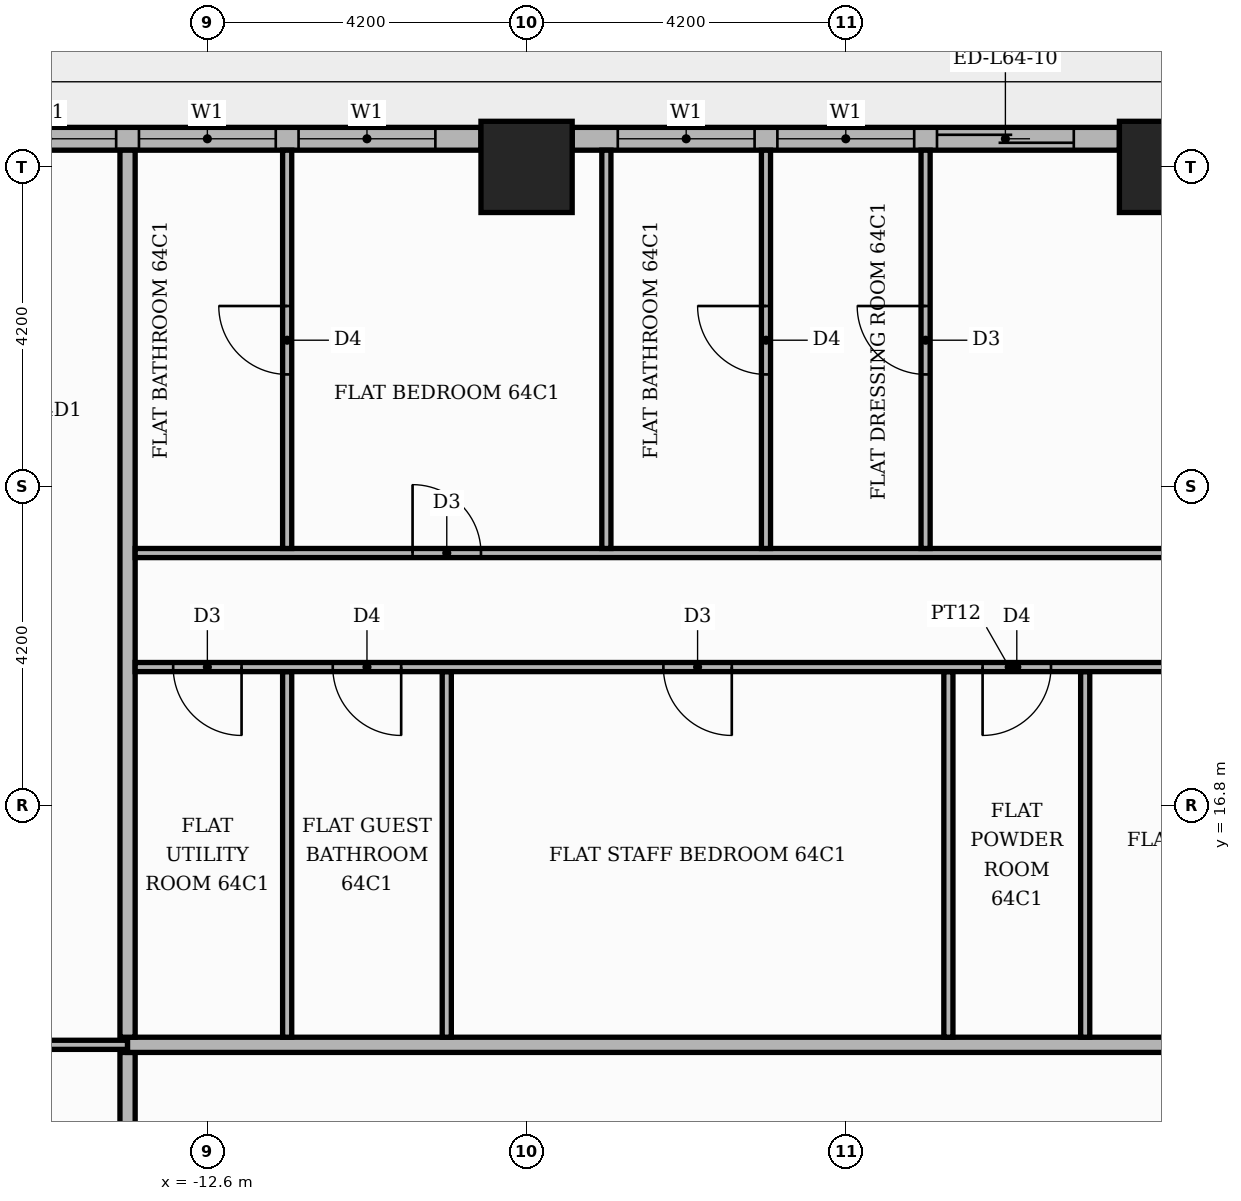
"""IFC4 building model, lengths in metres.
Left out: names, types, materials, properties, quantities, classifications, styles, units other than length and angle.
Written with IfcOpenShell. Run it as: python <this file> out.ifc"""

import sys

from ifc_helpers import new_model, si_unit, direction, frame, frame_2d, origin, origin_2d, place, context, subcontext, project, spatial, rectangle, extrude, element, fill, save


model = new_model("IFC4")
c1 = context("Model", 3, precision=1e-05, world=origin(), true_north=direction((0.0, 1.0)))
c2 = subcontext(c1, "Body", "Model", "MODEL_VIEW")
j1 = project(units=[si_unit("LENGTHUNIT", "METRE"), si_unit("PLANEANGLEUNIT", "RADIAN")], contexts=[c1])
p1 = place(None, origin())
s1 = spatial("IfcSite", under=j1, at=p1, CompositionType="ELEMENT")
p2 = place(p1, origin())
s2 = spatial("IfcBuilding", under=s1, at=p2, CompositionType="ELEMENT")
p3 = place(p2, frame((0.0, 0.0, 267.9)))
s3 = spatial("IfcBuildingStorey", under=s2, at=p3, CompositionType="ELEMENT", Elevation=267.9)
for number, where, z_axis, x_axis in (
    (1, (0.0, 25.2, 0.0), (0.0, 0.0, 1.0), (1.0, 0.0, 0.0)),
    (2, (-8.4, 25.2, 0.0), (0.0, 0.0, 1.0), (1.0, 0.0, 0.0)),
):
    element("IfcColumn", number, at=place(p3, frame(where, z_axis=z_axis, x_axis=x_axis)), inside=s3, PredefinedType="COLUMN", context=c2, shape_type="SweptSolid", body=[
        extrude(rectangle(XDim=1.2, YDim=1.2, at=origin_2d()), origin(), (0.0, 0.0, 1.0), 3.9),
    ])
p4 = place(p3, frame((-0.6, 25.57, 0.0), z_axis=(0.0, 0.0, 1.0), x_axis=(-1.0, 0.0, 0.0)))
e3 = element("IfcWall", 3, at=p4, inside=s3, PredefinedType="STANDARD", context=c2, shape_type="SweptSolid", body=[
    extrude(rectangle(XDim=7.2, YDim=0.3, at=frame_2d((3.6, 0.0))), origin(), (0.0, 0.0, 1.0), 3.48),
])
p5 = place(p4, frame((0.6, 0.0, 0.0)))
e4 = element("IfcOpeningElement", 4, at=p5, cuts=e3, PredefinedType="OPENING", context=c2, shape_type="SweptSolid", body=[
    extrude(rectangle(XDim=1.8, YDim=2.4, at=frame_2d((0.9, 1.2))), frame((0.0, 0.16, 0.0), z_axis=(0.0, -1.0, 0.0), x_axis=(1.0, 0.0, 0.0)), (0.0, 0.0, 1.0), 0.32),
])
p6 = place(p4, frame((2.7, 0.0, 0.9)))
e5 = element("IfcOpeningElement", 5, at=p6, cuts=e3, PredefinedType="OPENING", context=c2, shape_type="SweptSolid", body=[
    extrude(rectangle(XDim=1.8, YDim=2.1, at=frame_2d((0.9, 1.05))), frame((0.0, 0.16, 0.0), z_axis=(0.0, -1.0, 0.0), x_axis=(1.0, 0.0, 0.0)), (0.0, 0.0, 1.0), 0.32),
])
p7 = place(p4, frame((4.8, 0.0, 0.9)))
e6 = element("IfcOpeningElement", 6, at=p7, cuts=e3, PredefinedType="OPENING", context=c2, shape_type="SweptSolid", body=[
    extrude(rectangle(XDim=1.8, YDim=2.1, at=frame_2d((0.9, 1.05))), frame((0.0, 0.16, 0.0), z_axis=(0.0, -1.0, 0.0), x_axis=(1.0, 0.0, 0.0)), (0.0, 0.0, 1.0), 0.32),
])
p8 = place(p3, frame((-9.0, 25.57, 0.0), z_axis=(0.0, 0.0, 1.0), x_axis=(-1.0, 0.0, 0.0)))
e7 = element("IfcWall", 7, at=p8, inside=s3, PredefinedType="STANDARD", context=c2, shape_type="SweptSolid", body=[
    extrude(rectangle(XDim=7.2, YDim=0.3, at=frame_2d((3.6, 0.0))), origin(), (0.0, 0.0, 1.0), 3.48),
])
p9 = place(p8, frame((0.6, 0.0, 0.9)))
e8 = element("IfcOpeningElement", 8, at=p9, cuts=e7, PredefinedType="OPENING", context=c2, shape_type="SweptSolid", body=[
    extrude(rectangle(XDim=1.8, YDim=2.1, at=frame_2d((0.9, 1.05))), frame((0.0, 0.16, 0.0), z_axis=(0.0, -1.0, 0.0), x_axis=(1.0, 0.0, 0.0)), (0.0, 0.0, 1.0), 0.32),
])
p10 = place(p8, frame((2.7, 0.0, 0.9)))
e9 = element("IfcOpeningElement", 9, at=p10, cuts=e7, PredefinedType="OPENING", context=c2, shape_type="SweptSolid", body=[
    extrude(rectangle(XDim=1.8, YDim=2.1, at=frame_2d((0.9, 1.05))), frame((0.0, 0.16, 0.0), z_axis=(0.0, -1.0, 0.0), x_axis=(1.0, 0.0, 0.0)), (0.0, 0.0, 1.0), 0.32),
])
p11 = place(p8, frame((4.8, 0.0, 0.9)))
e10 = element("IfcOpeningElement", 10, at=p11, cuts=e7, PredefinedType="OPENING", context=c2, shape_type="SweptSolid", body=[
    extrude(rectangle(XDim=1.8, YDim=2.1, at=frame_2d((0.9, 1.05))), frame((0.0, 0.16, 0.0), z_axis=(0.0, -1.0, 0.0), x_axis=(1.0, 0.0, 0.0)), (0.0, 0.0, 1.0), 0.32),
])
p12 = place(p3, frame((-13.65, 11.1, 0.0), z_axis=(0.0, 0.0, 1.0), x_axis=(0.0, 1.0, 0.0)))
e11 = element("IfcWall", 11, at=p12, inside=s3, PredefinedType="PARTITIONING", context=c2, shape_type="SweptSolid", body=[
    extrude(rectangle(XDim=2.45, YDim=0.2, at=frame_2d((1.225, 0.0))), origin(), (0.0, 0.0, 1.0), 3.48),
])
p13 = place(p3, frame((-20.42, 13.65, 0.0), z_axis=(0.0, 0.0, 1.0), x_axis=(1.0, 0.0, 0.0)))
e12 = element("IfcWall", 12, at=p13, inside=s3, PredefinedType="PARTITIONING", context=c2, shape_type="SweptSolid", body=[
    extrude(rectangle(XDim=6.77, YDim=0.12, at=frame_2d((3.385, 0.0))), origin(), (0.0, 0.0, 1.0), 3.48),
])
p14 = place(p13, frame((2.885, 0.0, 0.0)))
e13 = element("IfcOpeningElement", 13, at=p14, cuts=e12, PredefinedType="OPENING", context=c2, shape_type="SweptSolid", body=[
    extrude(rectangle(XDim=1.0, YDim=2.1, at=frame_2d((0.5, 1.05))), frame((0.0, 0.07, 0.0), z_axis=(0.0, -1.0, 0.0), x_axis=(1.0, 0.0, 0.0)), (0.0, 0.0, 1.0), 0.14),
])
p15 = place(p3, frame((-13.65, 13.65, 0.0), z_axis=(0.0, 0.0, 1.0), x_axis=(1.0, 0.0, 0.0)))
e14 = element("IfcWall", 14, at=p15, inside=s3, PredefinedType="PARTITIONING", context=c2, shape_type="SweptSolid", body=[
    extrude(rectangle(XDim=39.07, YDim=0.2, at=frame_2d((19.535, 0.0))), origin(), (0.0, 0.0, 1.0), 3.48),
])
p16 = place(p15, frame((24.65, 0.0, 0.0)))
e15 = element("IfcOpeningElement", 15, at=p16, cuts=e14, PredefinedType="OPENING", context=c2, shape_type="SweptSolid", body=[
    extrude(rectangle(XDim=1.1, YDim=2.4, at=frame_2d((0.55, 1.2))), frame((0.0, 0.11, 0.0), z_axis=(0.0, -1.0, 0.0), x_axis=(1.0, 0.0, 0.0)), (0.0, 0.0, 1.0), 0.22),
])
p17 = place(p3, frame((-13.65, 13.75, 0.0), z_axis=(0.0, 0.0, 1.0), x_axis=(0.0, 1.0, 0.0)))
e16 = element("IfcWall", 16, at=p17, inside=s3, PredefinedType="PARTITIONING", context=c2, shape_type="SweptSolid", body=[
    extrude(rectangle(XDim=11.67, YDim=0.2, at=frame_2d((5.835, 0.0))), origin(), (0.0, 0.0, 1.0), 3.48),
])
for number, where, z_axis, x_axis in (
    (17, (-11.55, 13.75, 0.0), (0.0, 0.0, 1.0), (0.0, 1.0, 0.0)),
    (18, (-9.45, 13.75, 0.0), (0.0, 0.0, 1.0), (0.0, 1.0, 0.0)),
    (19, (-2.85, 13.75, 0.0), (0.0, 0.0, 1.0), (0.0, 1.0, 0.0)),
    (20, (-1.05, 13.75, 0.0), (0.0, 0.0, 1.0), (0.0, 1.0, 0.0)),
):
    element("IfcWall", number, at=place(p3, frame(where, z_axis=z_axis, x_axis=x_axis)), inside=s3, PredefinedType="PARTITIONING", context=c2, shape_type="SweptSolid", body=[
        extrude(rectangle(XDim=4.81, YDim=0.12, at=frame_2d((2.405, 0.0))), origin(), (0.0, 0.0, 1.0), 3.48),
    ])
p18 = place(p3, frame((-13.55, 18.62, 0.0), z_axis=(0.0, 0.0, 1.0), x_axis=(1.0, 0.0, 0.0)))
e21 = element("IfcWall", 21, at=p18, inside=s3, PredefinedType="PARTITIONING", context=c2, shape_type="SweptSolid", body=[
    extrude(rectangle(XDim=23.0, YDim=0.12, at=frame_2d((11.5, 0.0))), origin(), (0.0, 0.0, 1.0), 3.48),
])
p19 = place(p18, frame((19.25, 0.0, 0.0)))
e22 = element("IfcOpeningElement", 22, at=p19, cuts=e21, PredefinedType="OPENING", context=c2, shape_type="SweptSolid", body=[
    extrude(rectangle(XDim=0.9, YDim=2.1, at=frame_2d((0.45, 1.05))), frame((0.0, 0.07, 0.0), z_axis=(0.0, -1.0, 0.0), x_axis=(1.0, 0.0, 0.0)), (0.0, 0.0, 1.0), 0.14),
])
p20 = place(p18, frame((14.0, 0.0, 0.0)))
e23 = element("IfcOpeningElement", 23, at=p20, cuts=e21, PredefinedType="OPENING", context=c2, shape_type="SweptSolid", body=[
    extrude(rectangle(XDim=0.9, YDim=2.1, at=frame_2d((0.45, 1.05))), frame((0.0, 0.07, 0.0), z_axis=(0.0, -1.0, 0.0), x_axis=(1.0, 0.0, 0.0)), (0.0, 0.0, 1.0), 0.14),
])
p21 = place(p18, frame((11.15, 0.0, 0.0)))
e24 = element("IfcOpeningElement", 24, at=p21, cuts=e21, PredefinedType="OPENING", context=c2, shape_type="SweptSolid", body=[
    extrude(rectangle(XDim=0.9, YDim=2.1, at=frame_2d((0.45, 1.05))), frame((0.0, 0.07, 0.0), z_axis=(0.0, -1.0, 0.0), x_axis=(1.0, 0.0, 0.0)), (0.0, 0.0, 1.0), 0.14),
])
p22 = place(p18, frame((6.95, 0.0, 0.0)))
e25 = element("IfcOpeningElement", 25, at=p22, cuts=e21, PredefinedType="OPENING", context=c2, shape_type="SweptSolid", body=[
    extrude(rectangle(XDim=0.9, YDim=2.1, at=frame_2d((0.45, 1.05))), frame((0.0, 0.07, 0.0), z_axis=(0.0, -1.0, 0.0), x_axis=(1.0, 0.0, 0.0)), (0.0, 0.0, 1.0), 0.14),
])
p23 = place(p18, frame((2.6, 0.0, 0.0)))
e26 = element("IfcOpeningElement", 26, at=p23, cuts=e21, PredefinedType="OPENING", context=c2, shape_type="SweptSolid", body=[
    extrude(rectangle(XDim=0.9, YDim=2.1, at=frame_2d((0.45, 1.05))), frame((0.0, 0.07, 0.0), z_axis=(0.0, -1.0, 0.0), x_axis=(1.0, 0.0, 0.0)), (0.0, 0.0, 1.0), 0.14),
])
p24 = place(p18, frame((0.5, 0.0, 0.0)))
e27 = element("IfcOpeningElement", 27, at=p24, cuts=e21, PredefinedType="OPENING", context=c2, shape_type="SweptSolid", body=[
    extrude(rectangle(XDim=0.9, YDim=2.1, at=frame_2d((0.45, 1.05))), frame((0.0, 0.07, 0.0), z_axis=(0.0, -1.0, 0.0), x_axis=(1.0, 0.0, 0.0)), (0.0, 0.0, 1.0), 0.14),
])
p25 = place(p3, frame((-13.55, 20.12, 0.0), z_axis=(0.0, 0.0, 1.0), x_axis=(1.0, 0.0, 0.0)))
e28 = element("IfcWall", 28, at=p25, inside=s3, PredefinedType="PARTITIONING", context=c2, shape_type="SweptSolid", body=[
    extrude(rectangle(XDim=34.269, YDim=0.12, at=frame_2d((17.135, 0.0))), origin(), (0.0, 0.0, 1.0), 3.48),
])
p26 = place(p25, frame((27.75, 0.0, 0.0)))
e29 = element("IfcOpeningElement", 29, at=p26, cuts=e28, PredefinedType="OPENING", context=c2, shape_type="SweptSolid", body=[
    extrude(rectangle(XDim=1.0, YDim=2.1, at=frame_2d((0.5, 1.05))), frame((0.0, 0.07, 0.0), z_axis=(0.0, -1.0, 0.0), x_axis=(1.0, 0.0, 0.0)), (0.0, 0.0, 1.0), 0.14),
])
p27 = place(p25, frame((22.5, 0.0, 0.0)))
e30 = element("IfcOpeningElement", 30, at=p27, cuts=e28, PredefinedType="OPENING", context=c2, shape_type="SweptSolid", body=[
    extrude(rectangle(XDim=1.0, YDim=2.1, at=frame_2d((0.5, 1.05))), frame((0.0, 0.07, 0.0), z_axis=(0.0, -1.0, 0.0), x_axis=(1.0, 0.0, 0.0)), (0.0, 0.0, 1.0), 0.14),
])
p28 = place(p25, frame((14.15, 0.0, 0.0)))
e31 = element("IfcOpeningElement", 31, at=p28, cuts=e28, PredefinedType="OPENING", context=c2, shape_type="SweptSolid", body=[
    extrude(rectangle(XDim=0.9, YDim=2.1, at=frame_2d((0.45, 1.05))), frame((0.0, 0.07, 0.0), z_axis=(0.0, -1.0, 0.0), x_axis=(1.0, 0.0, 0.0)), (0.0, 0.0, 1.0), 0.14),
])
p29 = place(p25, frame((3.65, 0.0, 0.0)))
e32 = element("IfcOpeningElement", 32, at=p29, cuts=e28, PredefinedType="OPENING", context=c2, shape_type="SweptSolid", body=[
    extrude(rectangle(XDim=0.9, YDim=2.1, at=frame_2d((0.45, 1.05))), frame((0.0, 0.07, 0.0), z_axis=(0.0, -1.0, 0.0), x_axis=(1.0, 0.0, 0.0)), (0.0, 0.0, 1.0), 0.14),
])
p30 = place(p3, frame((-11.55, 20.18, 0.0), z_axis=(0.0, 0.0, 1.0), x_axis=(0.0, 1.0, 0.0)))
e33 = element("IfcWall", 33, at=p30, inside=s3, PredefinedType="PARTITIONING", context=c2, shape_type="SweptSolid", body=[
    extrude(rectangle(XDim=5.24, YDim=0.12, at=frame_2d((2.62, 0.0))), origin(), (0.0, 0.0, 1.0), 3.48),
])
p31 = place(p30, frame((2.29, 0.0, 0.0)))
e34 = element("IfcOpeningElement", 34, at=p31, cuts=e33, PredefinedType="OPENING", context=c2, shape_type="SweptSolid", body=[
    extrude(rectangle(XDim=0.9, YDim=2.1, at=frame_2d((0.45, 1.05))), frame((0.0, 0.07, 0.0), z_axis=(0.0, -1.0, 0.0), x_axis=(1.0, 0.0, 0.0)), (0.0, 0.0, 1.0), 0.14),
])
p32 = place(p3, frame((-7.35, 20.18, 0.0), z_axis=(0.0, 0.0, 1.0), x_axis=(0.0, 1.0, 0.0)))
e35 = element("IfcWall", 35, at=p32, inside=s3, PredefinedType="PARTITIONING", context=c2, shape_type="SweptSolid", body=[
    extrude(rectangle(XDim=5.24, YDim=0.12, at=frame_2d((2.62, 0.0))), origin(), (0.0, 0.0, 1.0), 3.48),
])
p33 = place(p3, frame((-5.25, 20.18, 0.0), z_axis=(0.0, 0.0, 1.0), x_axis=(0.0, 1.0, 0.0)))
e36 = element("IfcWall", 36, at=p33, inside=s3, PredefinedType="PARTITIONING", context=c2, shape_type="SweptSolid", body=[
    extrude(rectangle(XDim=5.24, YDim=0.12, at=frame_2d((2.62, 0.0))), origin(), (0.0, 0.0, 1.0), 3.48),
])
p34 = place(p33, frame((2.29, 0.0, 0.0)))
e37 = element("IfcOpeningElement", 37, at=p34, cuts=e36, PredefinedType="OPENING", context=c2, shape_type="SweptSolid", body=[
    extrude(rectangle(XDim=0.9, YDim=2.1, at=frame_2d((0.45, 1.05))), frame((0.0, 0.07, 0.0), z_axis=(0.0, -1.0, 0.0), x_axis=(1.0, 0.0, 0.0)), (0.0, 0.0, 1.0), 0.14),
])
p35 = place(p3, frame((-3.15, 20.18, 0.0), z_axis=(0.0, 0.0, 1.0), x_axis=(0.0, 1.0, 0.0)))
e38 = element("IfcWall", 38, at=p35, inside=s3, PredefinedType="PARTITIONING", context=c2, shape_type="SweptSolid", body=[
    extrude(rectangle(XDim=5.24, YDim=0.12, at=frame_2d((2.62, 0.0))), origin(), (0.0, 0.0, 1.0), 3.48),
])
p36 = place(p35, frame((2.29, 0.0, 0.0)))
e39 = element("IfcOpeningElement", 39, at=p36, cuts=e38, PredefinedType="OPENING", context=c2, shape_type="SweptSolid", body=[
    extrude(rectangle(XDim=0.9, YDim=2.1, at=frame_2d((0.45, 1.05))), frame((0.0, 0.07, 0.0), z_axis=(0.0, -1.0, 0.0), x_axis=(1.0, 0.0, 0.0)), (0.0, 0.0, 1.0), 0.14),
])
p37 = place(p5, origin())
e40 = element("IfcDoor", 40, at=p37, inside=s3, OperationType="SLIDING_TO_LEFT", PredefinedType="DOOR", context=c2, shape_type="SweptSolid", body=[
    extrude(rectangle(XDim=1.8, YDim=2.4, at=frame_2d((0.9, 1.2))), frame((0.0, 0.025, 0.0), z_axis=(0.0, -1.0, 0.0), x_axis=(1.0, 0.0, 0.0)), (0.0, 0.0, 1.0), 0.05),
])
fill(e4, e40)
p38 = place(p6, origin())
e41 = element("IfcWindow", 41, at=p38, inside=s3, PartitioningType="SINGLE_PANEL", PredefinedType="WINDOW", context=c2, shape_type="SweptSolid", body=[
    extrude(rectangle(XDim=1.8, YDim=2.1, at=frame_2d((0.9, 1.05))), frame((0.0, 0.03, 0.0), z_axis=(0.0, -1.0, 0.0), x_axis=(1.0, 0.0, 0.0)), (0.0, 0.0, 1.0), 0.06),
])
fill(e5, e41)
p39 = place(p7, origin())
e42 = element("IfcWindow", 42, at=p39, inside=s3, PartitioningType="SINGLE_PANEL", PredefinedType="WINDOW", context=c2, shape_type="SweptSolid", body=[
    extrude(rectangle(XDim=1.8, YDim=2.1, at=frame_2d((0.9, 1.05))), frame((0.0, 0.03, 0.0), z_axis=(0.0, -1.0, 0.0), x_axis=(1.0, 0.0, 0.0)), (0.0, 0.0, 1.0), 0.06),
])
fill(e6, e42)
p40 = place(p9, origin())
e43 = element("IfcWindow", 43, at=p40, inside=s3, PartitioningType="SINGLE_PANEL", PredefinedType="WINDOW", context=c2, shape_type="SweptSolid", body=[
    extrude(rectangle(XDim=1.8, YDim=2.1, at=frame_2d((0.9, 1.05))), frame((0.0, 0.03, 0.0), z_axis=(0.0, -1.0, 0.0), x_axis=(1.0, 0.0, 0.0)), (0.0, 0.0, 1.0), 0.06),
])
fill(e8, e43)
p41 = place(p10, origin())
e44 = element("IfcWindow", 44, at=p41, inside=s3, PartitioningType="SINGLE_PANEL", PredefinedType="WINDOW", context=c2, shape_type="SweptSolid", body=[
    extrude(rectangle(XDim=1.8, YDim=2.1, at=frame_2d((0.9, 1.05))), frame((0.0, 0.03, 0.0), z_axis=(0.0, -1.0, 0.0), x_axis=(1.0, 0.0, 0.0)), (0.0, 0.0, 1.0), 0.06),
])
fill(e9, e44)
p42 = place(p11, origin())
e45 = element("IfcWindow", 45, at=p42, inside=s3, PartitioningType="SINGLE_PANEL", PredefinedType="WINDOW", context=c2, shape_type="SweptSolid", body=[
    extrude(rectangle(XDim=1.8, YDim=2.1, at=frame_2d((0.9, 1.05))), frame((0.0, 0.03, 0.0), z_axis=(0.0, -1.0, 0.0), x_axis=(1.0, 0.0, 0.0)), (0.0, 0.0, 1.0), 0.06),
])
fill(e10, e45)
p43 = place(p21, frame((0.9, 0.0, 0.0), z_axis=(0.0, 0.0, 1.0), x_axis=(-1.0, 0.0, 0.0)))
e46 = element("IfcDoor", 46, at=p43, inside=s3, OperationType="SINGLE_SWING_LEFT", PredefinedType="DOOR", context=c2, shape_type="SweptSolid", body=[
    extrude(rectangle(XDim=0.9, YDim=2.1, at=frame_2d((0.45, 1.05))), frame((0.0, 0.025, 0.0), z_axis=(0.0, -1.0, 0.0), x_axis=(1.0, 0.0, 0.0)), (0.0, 0.0, 1.0), 0.05),
])
fill(e24, e46)
p44 = place(p22, frame((0.9, 0.0, 0.0), z_axis=(0.0, 0.0, 1.0), x_axis=(-1.0, 0.0, 0.0)))
e47 = element("IfcDoor", 47, at=p44, inside=s3, OperationType="SINGLE_SWING_RIGHT", PredefinedType="DOOR", context=c2, shape_type="SweptSolid", body=[
    extrude(rectangle(XDim=0.9, YDim=2.1, at=frame_2d((0.45, 1.05))), frame((0.0, 0.025, 0.0), z_axis=(0.0, -1.0, 0.0), x_axis=(1.0, 0.0, 0.0)), (0.0, 0.0, 1.0), 0.05),
])
fill(e25, e47)
p45 = place(p23, frame((0.9, 0.0, 0.0), z_axis=(0.0, 0.0, 1.0), x_axis=(-1.0, 0.0, 0.0)))
e48 = element("IfcDoor", 48, at=p45, inside=s3, OperationType="SINGLE_SWING_RIGHT", PredefinedType="DOOR", context=c2, shape_type="SweptSolid", body=[
    extrude(rectangle(XDim=0.9, YDim=2.1, at=frame_2d((0.45, 1.05))), frame((0.0, 0.025, 0.0), z_axis=(0.0, -1.0, 0.0), x_axis=(1.0, 0.0, 0.0)), (0.0, 0.0, 1.0), 0.05),
])
fill(e26, e48)
p46 = place(p24, frame((0.9, 0.0, 0.0), z_axis=(0.0, 0.0, 1.0), x_axis=(-1.0, 0.0, 0.0)))
e49 = element("IfcDoor", 49, at=p46, inside=s3, OperationType="SINGLE_SWING_RIGHT", PredefinedType="DOOR", context=c2, shape_type="SweptSolid", body=[
    extrude(rectangle(XDim=0.9, YDim=2.1, at=frame_2d((0.45, 1.05))), frame((0.0, 0.025, 0.0), z_axis=(0.0, -1.0, 0.0), x_axis=(1.0, 0.0, 0.0)), (0.0, 0.0, 1.0), 0.05),
])
fill(e27, e49)
p47 = place(p36, origin())
e50 = element("IfcDoor", 50, at=p47, inside=s3, OperationType="SINGLE_SWING_RIGHT", PredefinedType="DOOR", context=c2, shape_type="SweptSolid", body=[
    extrude(rectangle(XDim=0.9, YDim=2.1, at=frame_2d((0.45, 1.05))), frame((0.0, 0.025, 0.0), z_axis=(0.0, -1.0, 0.0), x_axis=(1.0, 0.0, 0.0)), (0.0, 0.0, 1.0), 0.05),
])
fill(e39, e50)
p48 = place(p34, origin())
e51 = element("IfcDoor", 51, at=p48, inside=s3, OperationType="SINGLE_SWING_RIGHT", PredefinedType="DOOR", context=c2, shape_type="SweptSolid", body=[
    extrude(rectangle(XDim=0.9, YDim=2.1, at=frame_2d((0.45, 1.05))), frame((0.0, 0.025, 0.0), z_axis=(0.0, -1.0, 0.0), x_axis=(1.0, 0.0, 0.0)), (0.0, 0.0, 1.0), 0.05),
])
fill(e37, e51)
p49 = place(p29, origin())
e52 = element("IfcDoor", 52, at=p49, inside=s3, OperationType="SINGLE_SWING_LEFT", PredefinedType="DOOR", context=c2, shape_type="SweptSolid", body=[
    extrude(rectangle(XDim=0.9, YDim=2.1, at=frame_2d((0.45, 1.05))), frame((0.0, 0.025, 0.0), z_axis=(0.0, -1.0, 0.0), x_axis=(1.0, 0.0, 0.0)), (0.0, 0.0, 1.0), 0.05),
])
fill(e32, e52)
p50 = place(p31, origin())
e53 = element("IfcDoor", 53, at=p50, inside=s3, OperationType="SINGLE_SWING_RIGHT", PredefinedType="DOOR", context=c2, shape_type="SweptSolid", body=[
    extrude(rectangle(XDim=0.9, YDim=2.1, at=frame_2d((0.45, 1.05))), frame((0.0, 0.025, 0.0), z_axis=(0.0, -1.0, 0.0), x_axis=(1.0, 0.0, 0.0)), (0.0, 0.0, 1.0), 0.05),
])
fill(e34, e53)
save(model, sys.argv[1])
